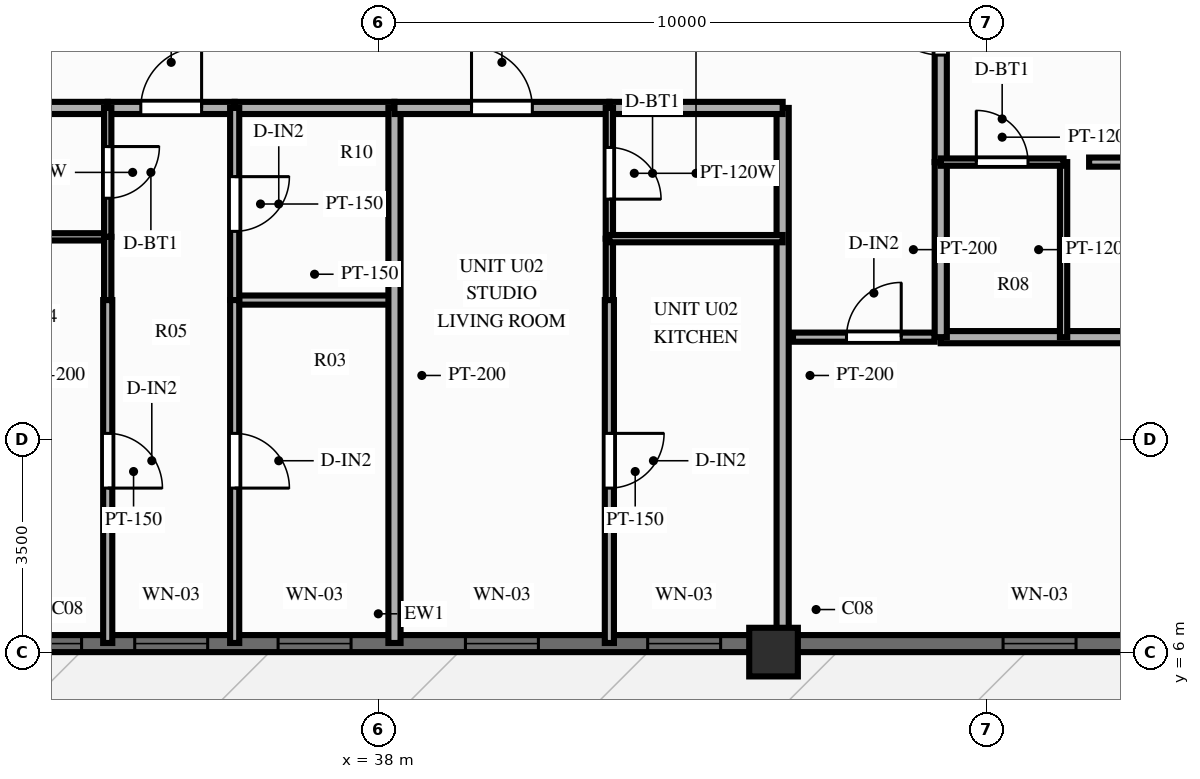
"""IFC4 building model, lengths in metres.
Left out: names, types, materials, properties, quantities, classifications, styles, units other than length and angle.
Written with IfcOpenShell. Run it as: python <this file> out.ifc"""

import sys

from ifc_helpers import new_model, si_unit, direction, frame, frame_2d, origin, origin_2d, place, context, subcontext, project, spatial, rectangle, extrude, source, transform, mapped, element, fill, save


model = new_model("IFC4")
c1 = context("Model", 3, precision=1e-05, world=origin(), true_north=direction((0.0, 1.0)))
c2 = subcontext(c1, "Body", "Model", "MODEL_VIEW")
j1 = project(units=[si_unit("LENGTHUNIT", "METRE"), si_unit("PLANEANGLEUNIT", "RADIAN")], contexts=[c1])
p1 = place(None, origin())
s1 = spatial("IfcSite", under=j1, at=p1, CompositionType="ELEMENT")
p2 = place(p1, origin())
s2 = spatial("IfcBuilding", under=s1, at=p2, CompositionType="ELEMENT")
p3 = place(p2, frame((0.0, 0.0, 179.8)))
s3 = spatial("IfcBuildingStorey", under=s2, at=p3, CompositionType="ELEMENT", Elevation=179.8)
m1 = source(origin(), c2, "Body", "SweptSolid", [
    extrude(rectangle(XDim=0.8, YDim=0.8, at=origin_2d()), origin(), (0.0, 0.0, 1.0), 3.0),
])
p4 = place(p3, frame((44.5, 6.0, 0.0), z_axis=(0.0, 0.0, 1.0), x_axis=(1.0, 0.0, 0.0)))
e1 = element("IfcColumn", 1, at=p4, inside=s3, PredefinedType="COLUMN", context=c2, shape_type="MappedRepresentation", body=[
    mapped(m1, transform((0.0, 0.0, 0.0), scale=1.0)),
])
p5 = place(p3, frame((22.75, 6.14, 0.0), z_axis=(0.0, 0.0, 1.0), x_axis=(1.0, 0.0, 0.0)))
e2 = element("IfcWall", 2, at=p5, inside=s3, PredefinedType="SOLIDWALL", context=c2, shape_type="SweptSolid", body=[
    extrude(rectangle(XDim=30.5, YDim=0.28, at=frame_2d((15.25, 0.0))), origin(), (0.0, 0.0, 1.0), 2.28),
])
p6 = place(p5, frame((4.925, 0.0, 0.0), z_axis=(0.0, 0.0, 1.0), x_axis=(-1.0, 0.0, 0.0)))
e3 = element("IfcOpeningElement", 3, at=p6, cuts=e2, PredefinedType="OPENING", context=c2, shape_type="SweptSolid", body=[
    extrude(rectangle(XDim=1.1, YDim=2.15, at=frame_2d((0.55, 1.075))), frame((0.0, 0.152, 0.0), z_axis=(0.0, -1.0, 0.0), x_axis=(1.0, 0.0, 0.0)), (0.0, 0.0, 1.0), 0.304),
])
p7 = place(p5, frame((9.42, 0.0, 0.25)))
e4 = element("IfcOpeningElement", 4, at=p7, cuts=e2, PredefinedType="OPENING", context=c2, shape_type="SweptSolid", body=[
    extrude(rectangle(XDim=0.95, YDim=1.5, at=frame_2d((0.475, 0.75))), frame((0.0, 0.152, 0.0), z_axis=(0.0, -1.0, 0.0), x_axis=(1.0, 0.0, 0.0)), (0.0, 0.0, 1.0), 0.304),
])
p8 = place(p5, frame((11.244, 0.0, 0.25)))
e5 = element("IfcOpeningElement", 5, at=p8, cuts=e2, PredefinedType="OPENING", context=c2, shape_type="SweptSolid", body=[
    extrude(rectangle(XDim=1.2, YDim=1.5, at=frame_2d((0.6, 0.75))), frame((0.0, 0.152, 0.0), z_axis=(0.0, -1.0, 0.0), x_axis=(1.0, 0.0, 0.0)), (0.0, 0.0, 1.0), 0.304),
])
p9 = place(p5, frame((13.602, 0.0, 0.25)))
e6 = element("IfcOpeningElement", 6, at=p9, cuts=e2, PredefinedType="OPENING", context=c2, shape_type="SweptSolid", body=[
    extrude(rectangle(XDim=1.2, YDim=1.5, at=frame_2d((0.6, 0.75))), frame((0.0, 0.152, 0.0), z_axis=(0.0, -1.0, 0.0), x_axis=(1.0, 0.0, 0.0)), (0.0, 0.0, 1.0), 0.304),
])
p10 = place(p5, frame((16.683, 0.0, 0.25)))
e7 = element("IfcOpeningElement", 7, at=p10, cuts=e2, PredefinedType="OPENING", context=c2, shape_type="SweptSolid", body=[
    extrude(rectangle(XDim=1.2, YDim=1.5, at=frame_2d((0.6, 0.75))), frame((0.0, 0.152, 0.0), z_axis=(0.0, -1.0, 0.0), x_axis=(1.0, 0.0, 0.0)), (0.0, 0.0, 1.0), 0.304),
])
p11 = place(p5, frame((19.68, 0.0, 0.25)))
e8 = element("IfcOpeningElement", 8, at=p11, cuts=e2, PredefinedType="OPENING", context=c2, shape_type="SweptSolid", body=[
    extrude(rectangle(XDim=1.2, YDim=1.5, at=frame_2d((0.6, 0.75))), frame((0.0, 0.152, 0.0), z_axis=(0.0, -1.0, 0.0), x_axis=(1.0, 0.0, 0.0)), (0.0, 0.0, 1.0), 0.304),
])
p12 = place(p5, frame((25.525, 0.0, 0.25)))
e9 = element("IfcOpeningElement", 9, at=p12, cuts=e2, PredefinedType="OPENING", context=c2, shape_type="SweptSolid", body=[
    extrude(rectangle(XDim=1.2, YDim=1.5, at=frame_2d((0.6, 0.75))), frame((0.0, 0.152, 0.0), z_axis=(0.0, -1.0, 0.0), x_axis=(1.0, 0.0, 0.0)), (0.0, 0.0, 1.0), 0.304),
])
p13 = place(p3, frame((44.82, 11.18, 0.0), z_axis=(0.0, 0.0, 1.0), x_axis=(1.0, 0.0, 0.0)))
e10 = element("IfcWall", 10, at=p13, inside=s3, PredefinedType="PARTITIONING", context=c2, shape_type="SweptSolid", body=[
    extrude(rectangle(XDim=2.33, YDim=0.15, at=frame_2d((1.165, 0.0))), origin(), (0.0, 0.0, 1.0), 2.79),
])
p14 = place(p13, frame((0.88, 0.0, 0.0)))
e11 = element("IfcOpeningElement", 11, at=p14, cuts=e10, PredefinedType="OPENING", context=c2, shape_type="SweptSolid", body=[
    extrude(rectangle(XDim=0.9, YDim=2.1, at=frame_2d((0.45, 1.05))), frame((0.0, 0.087, 0.0), z_axis=(0.0, -1.0, 0.0), x_axis=(1.0, 0.0, 0.0)), (0.0, 0.0, 1.0), 0.174),
])
p15 = place(p3, frame((44.65, 14.95, 0.0), z_axis=(0.0, 0.0, 1.0), x_axis=(0.0, -1.0, 0.0)))
e12 = element("IfcWall", 12, at=p15, inside=s3, PredefinedType="PARTITIONING", context=c2, shape_type="SweptSolid", body=[
    extrude(rectangle(XDim=8.8, YDim=0.2, at=frame_2d((4.4, 0.0))), origin(), (0.0, 0.0, 1.0), 2.39),
])
p16 = place(p3, frame((31.35, 14.95, 0.0), z_axis=(0.0, 0.0, 1.0), x_axis=(1.0, 0.0, 0.0)))
e13 = element("IfcWall", 13, at=p16, inside=s3, PredefinedType="PARTITIONING", context=c2, shape_type="SweptSolid", body=[
    extrude(rectangle(XDim=2.2, YDim=0.2, at=frame_2d((1.1, 0.0))), origin(), (0.0, 0.0, 1.0), 2.79),
])
p17 = place(p3, frame((33.55, 14.95, 0.0), z_axis=(0.0, 0.0, 1.0), x_axis=(1.0, 0.0, 0.0)))
e14 = element("IfcWall", 14, at=p17, inside=s3, PredefinedType="PARTITIONING", context=c2, shape_type="SweptSolid", body=[
    extrude(rectangle(XDim=2.088, YDim=0.2, at=frame_2d((1.044, 0.0))), origin(), (0.0, 0.0, 1.0), 2.79),
])
p18 = place(p17, frame((0.544, 0.0, 0.0)))
e15 = element("IfcOpeningElement", 15, at=p18, cuts=e14, PredefinedType="OPENING", context=c2, shape_type="SweptSolid", body=[
    extrude(rectangle(XDim=1.0, YDim=2.15, at=frame_2d((0.5, 1.075))), frame((0.0, 0.112, 0.0), z_axis=(0.0, -1.0, 0.0), x_axis=(1.0, 0.0, 0.0)), (0.0, 0.0, 1.0), 0.224),
])
p19 = place(p3, frame((35.638, 14.95, 0.0), z_axis=(0.0, 0.0, 1.0), x_axis=(1.0, 0.0, 0.0)))
e16 = element("IfcWall", 16, at=p19, inside=s3, PredefinedType="PARTITIONING", context=c2, shape_type="SweptSolid", body=[
    extrude(rectangle(XDim=2.628, YDim=0.2, at=frame_2d((1.314, 0.0))), origin(), (0.0, 0.0, 1.0), 2.79),
])
p20 = place(p3, frame((31.35, 12.83, 0.0), z_axis=(0.0, 0.0, 1.0), x_axis=(1.0, 0.0, 0.0)))
e17 = element("IfcWall", 17, at=p20, inside=s3, PredefinedType="PARTITIONING", context=c2, shape_type="SweptSolid", body=[
    extrude(rectangle(XDim=2.2, YDim=0.12, at=frame_2d((1.1, 0.0))), origin(), (0.0, 0.0, 1.0), 2.79),
])
p21 = place(p3, frame((35.638, 11.79, 0.0), z_axis=(0.0, 0.0, 1.0), x_axis=(1.0, 0.0, 0.0)))
e18 = element("IfcWall", 18, at=p21, inside=s3, PredefinedType="PARTITIONING", context=c2, shape_type="SweptSolid", body=[
    extrude(rectangle(XDim=2.628, YDim=0.15, at=frame_2d((1.314, 0.0))), origin(), (0.0, 0.0, 1.0), 2.49),
])
p22 = place(p3, frame((33.55, 14.95, 0.0), z_axis=(0.0, 0.0, 1.0), x_axis=(0.0, -1.0, 0.0)))
e19 = element("IfcWall", 19, at=p22, inside=s3, PredefinedType="PARTITIONING", context=c2, shape_type="SweptSolid", body=[
    extrude(rectangle(XDim=2.12, YDim=0.12, at=frame_2d((1.06, 0.0))), origin(), (0.0, 0.0, 1.0), 2.79),
])
p23 = place(p22, frame((0.635, 0.0, 0.0)))
e20 = element("IfcOpeningElement", 20, at=p23, cuts=e19, PredefinedType="OPENING", context=c2, shape_type="SweptSolid", body=[
    extrude(rectangle(XDim=0.85, YDim=2.05, at=frame_2d((0.425, 1.025))), frame((0.0, 0.072, 0.0), z_axis=(0.0, -1.0, 0.0), x_axis=(1.0, 0.0, 0.0)), (0.0, 0.0, 1.0), 0.144),
])
p24 = place(p3, frame((33.55, 12.83, 0.0), z_axis=(0.0, 0.0, 1.0), x_axis=(0.0, -1.0, 0.0)))
e21 = element("IfcWall", 21, at=p24, inside=s3, PredefinedType="PARTITIONING", context=c2, shape_type="SweptSolid", body=[
    extrude(rectangle(XDim=1.04, YDim=0.12, at=frame_2d((0.52, 0.0))), origin(), (0.0, 0.0, 1.0), 2.79),
])
p25 = place(p3, frame((33.55, 11.79, 0.0), z_axis=(0.0, 0.0, 1.0), x_axis=(0.0, -1.0, 0.0)))
e22 = element("IfcWall", 22, at=p25, inside=s3, PredefinedType="PARTITIONING", context=c2, shape_type="SweptSolid", body=[
    extrude(rectangle(XDim=5.64, YDim=0.15, at=frame_2d((2.82, 0.0))), origin(), (0.0, 0.0, 1.0), 2.79),
])
p26 = place(p25, frame((2.192, 0.0, 0.0)))
e23 = element("IfcOpeningElement", 23, at=p26, cuts=e22, PredefinedType="OPENING", context=c2, shape_type="SweptSolid", body=[
    extrude(rectangle(XDim=0.9, YDim=2.1, at=frame_2d((0.45, 1.05))), frame((0.0, 0.087, 0.0), z_axis=(0.0, -1.0, 0.0), x_axis=(1.0, 0.0, 0.0)), (0.0, 0.0, 1.0), 0.174),
])
p27 = place(p3, frame((35.638, 14.95, 0.0), z_axis=(0.0, 0.0, 1.0), x_axis=(0.0, -1.0, 0.0)))
e24 = element("IfcWall", 24, at=p27, inside=s3, PredefinedType="PARTITIONING", context=c2, shape_type="SweptSolid", body=[
    extrude(rectangle(XDim=3.16, YDim=0.15, at=frame_2d((1.58, 0.0))), origin(), (0.0, 0.0, 1.0), 2.79),
])
p28 = place(p27, frame((1.13, 0.0, 0.0)))
e25 = element("IfcOpeningElement", 25, at=p28, cuts=e24, PredefinedType="OPENING", context=c2, shape_type="SweptSolid", body=[
    extrude(rectangle(XDim=0.9, YDim=2.1, at=frame_2d((0.45, 1.05))), frame((0.0, 0.087, 0.0), z_axis=(0.0, -1.0, 0.0), x_axis=(1.0, 0.0, 0.0)), (0.0, 0.0, 1.0), 0.174),
])
p29 = place(p3, frame((35.638, 11.79, 0.0), z_axis=(0.0, 0.0, 1.0), x_axis=(0.0, -1.0, 0.0)))
e26 = element("IfcWall", 26, at=p29, inside=s3, PredefinedType="PARTITIONING", context=c2, shape_type="SweptSolid", body=[
    extrude(rectangle(XDim=5.64, YDim=0.15, at=frame_2d((2.82, 0.0))), origin(), (0.0, 0.0, 1.0), 2.79),
])
p30 = place(p29, frame((2.192, 0.0, 0.0)))
e27 = element("IfcOpeningElement", 27, at=p30, cuts=e26, PredefinedType="OPENING", context=c2, shape_type="SweptSolid", body=[
    extrude(rectangle(XDim=0.9, YDim=2.1, at=frame_2d((0.45, 1.05))), frame((0.0, 0.087, 0.0), z_axis=(0.0, -1.0, 0.0), x_axis=(1.0, 0.0, 0.0)), (0.0, 0.0, 1.0), 0.174),
])
p31 = place(p3, frame((38.266, 14.95, 0.0), z_axis=(0.0, 0.0, 1.0), x_axis=(0.0, -1.0, 0.0)))
e28 = element("IfcWall", 28, at=p31, inside=s3, PredefinedType="PARTITIONING", context=c2, shape_type="SweptSolid", body=[
    extrude(rectangle(XDim=8.8, YDim=0.2, at=frame_2d((4.4, 0.0))), origin(), (0.0, 0.0, 1.0), 2.79),
])
p32 = place(p3, frame((38.266, 14.95, 0.0), z_axis=(0.0, 0.0, 1.0), x_axis=(1.0, 0.0, 0.0)))
e29 = element("IfcWall", 29, at=p32, inside=s3, PredefinedType="PARTITIONING", context=c2, shape_type="SweptSolid", body=[
    extrude(rectangle(XDim=3.534, YDim=0.2, at=frame_2d((1.767, 0.0))), origin(), (0.0, 0.0, 1.0), 2.79),
])
p33 = place(p32, frame((1.267, 0.0, 0.0)))
e30 = element("IfcOpeningElement", 30, at=p33, cuts=e29, PredefinedType="OPENING", context=c2, shape_type="SweptSolid", body=[
    extrude(rectangle(XDim=1.0, YDim=2.15, at=frame_2d((0.5, 1.075))), frame((0.0, 0.112, 0.0), z_axis=(0.0, -1.0, 0.0), x_axis=(1.0, 0.0, 0.0)), (0.0, 0.0, 1.0), 0.224),
])
p34 = place(p3, frame((41.8, 14.95, 0.0), z_axis=(0.0, 0.0, 1.0), x_axis=(1.0, 0.0, 0.0)))
e31 = element("IfcWall", 31, at=p34, inside=s3, PredefinedType="PARTITIONING", context=c2, shape_type="SweptSolid", body=[
    extrude(rectangle(XDim=2.85, YDim=0.2, at=frame_2d((1.425, 0.0))), origin(), (0.0, 0.0, 1.0), 2.79),
])
p35 = place(p3, frame((41.8, 14.95, 0.0), z_axis=(0.0, 0.0, 1.0), x_axis=(0.0, -1.0, 0.0)))
e32 = element("IfcWall", 32, at=p35, inside=s3, PredefinedType="PARTITIONING", context=c2, shape_type="SweptSolid", body=[
    extrude(rectangle(XDim=2.15, YDim=0.12, at=frame_2d((1.075, 0.0))), origin(), (0.0, 0.0, 1.0), 2.79),
])
p36 = place(p35, frame((0.65, 0.0, 0.0)))
e33 = element("IfcOpeningElement", 33, at=p36, cuts=e32, PredefinedType="OPENING", context=c2, shape_type="SweptSolid", body=[
    extrude(rectangle(XDim=0.85, YDim=2.05, at=frame_2d((0.425, 1.025))), frame((0.0, 0.072, 0.0), z_axis=(0.0, -1.0, 0.0), x_axis=(1.0, 0.0, 0.0)), (0.0, 0.0, 1.0), 0.144),
])
p37 = place(p3, frame((41.8, 12.8, 0.0), z_axis=(0.0, 0.0, 1.0), x_axis=(0.0, -1.0, 0.0)))
e34 = element("IfcWall", 34, at=p37, inside=s3, PredefinedType="PARTITIONING", context=c2, shape_type="SweptSolid", body=[
    extrude(rectangle(XDim=1.01, YDim=0.12, at=frame_2d((0.505, 0.0))), origin(), (0.0, 0.0, 1.0), 2.79),
])
p38 = place(p3, frame((41.8, 12.8, 0.0), z_axis=(0.0, 0.0, 1.0), x_axis=(1.0, 0.0, 0.0)))
e35 = element("IfcWall", 35, at=p38, inside=s3, PredefinedType="PARTITIONING", context=c2, shape_type="SweptSolid", body=[
    extrude(rectangle(XDim=2.85, YDim=0.12, at=frame_2d((1.425, 0.0))), origin(), (0.0, 0.0, 1.0), 2.79),
])
p39 = place(p3, frame((41.8, 11.79, 0.0), z_axis=(0.0, 0.0, 1.0), x_axis=(0.0, -1.0, 0.0)))
e36 = element("IfcWall", 36, at=p39, inside=s3, PredefinedType="PARTITIONING", context=c2, shape_type="SweptSolid", body=[
    extrude(rectangle(XDim=5.64, YDim=0.15, at=frame_2d((2.82, 0.0))), origin(), (0.0, 0.0, 1.0), 2.79),
])
p40 = place(p39, frame((2.192, 0.0, 0.0)))
e37 = element("IfcOpeningElement", 37, at=p40, cuts=e36, PredefinedType="OPENING", context=c2, shape_type="SweptSolid", body=[
    extrude(rectangle(XDim=0.9, YDim=2.1, at=frame_2d((0.45, 1.05))), frame((0.0, 0.087, 0.0), z_axis=(0.0, -1.0, 0.0), x_axis=(1.0, 0.0, 0.0)), (0.0, 0.0, 1.0), 0.174),
])
p41 = place(p3, frame((47.25, 11.18, 0.0), z_axis=(0.0, 0.0, 1.0), x_axis=(1.0, 0.0, 0.0)))
e38 = element("IfcWall", 38, at=p41, inside=s3, PredefinedType="PARTITIONING", context=c2, shape_type="SweptSolid", body=[
    extrude(rectangle(XDim=10.85, YDim=0.2, at=frame_2d((5.425, 0.0))), origin(), (0.0, 0.0, 1.0), 2.79),
])
p42 = place(p3, frame((47.25, 11.18, 0.0), z_axis=(0.0, 0.0, 1.0), x_axis=(0.0, 1.0, 0.0)))
e39 = element("IfcWall", 39, at=p42, inside=s3, PredefinedType="PARTITIONING", context=c2, shape_type="SweptSolid", body=[
    extrude(rectangle(XDim=2.879, YDim=0.2, at=frame_2d((1.439, 0.0))), origin(), (0.0, 0.0, 1.0), 2.79),
])
p43 = place(p3, frame((47.25, 14.059, 0.0), z_axis=(0.0, 0.0, 1.0), x_axis=(0.0, 1.0, 0.0)))
e40 = element("IfcWall", 40, at=p43, inside=s3, PredefinedType="PARTITIONING", context=c2, shape_type="SweptSolid", body=[
    extrude(rectangle(XDim=4.651, YDim=0.2, at=frame_2d((2.326, 0.0))), origin(), (0.0, 0.0, 1.0), 2.79),
])
p44 = place(p43, frame((1.76, 0.0, 0.0)))
e41 = element("IfcOpeningElement", 41, at=p44, cuts=e40, PredefinedType="OPENING", context=c2, shape_type="SweptSolid", body=[
    extrude(rectangle(XDim=1.0, YDim=2.15, at=frame_2d((0.5, 1.075))), frame((0.0, 0.112, 0.0), z_axis=(0.0, -1.0, 0.0), x_axis=(1.0, 0.0, 0.0)), (0.0, 0.0, 1.0), 0.224),
])
p45 = place(p3, frame((49.27, 11.18, 0.0), z_axis=(0.0, 0.0, 1.0), x_axis=(0.0, 1.0, 0.0)))
e42 = element("IfcWall", 42, at=p45, inside=s3, PredefinedType="PARTITIONING", context=c2, shape_type="SweptSolid", body=[
    extrude(rectangle(XDim=2.879, YDim=0.12, at=frame_2d((1.439, 0.0))), origin(), (0.0, 0.0, 1.0), 2.79),
])
p46 = place(p3, frame((47.25, 14.059, 0.0), z_axis=(0.0, 0.0, 1.0), x_axis=(1.0, 0.0, 0.0)))
e43 = element("IfcWall", 43, at=p46, inside=s3, PredefinedType="PARTITIONING", context=c2, shape_type="SweptSolid", body=[
    extrude(rectangle(XDim=2.02, YDim=0.12, at=frame_2d((1.01, 0.0))), origin(), (0.0, 0.0, 1.0), 2.79),
])
p47 = place(p46, frame((0.585, 0.0, 0.0)))
e44 = element("IfcOpeningElement", 44, at=p47, cuts=e43, PredefinedType="OPENING", context=c2, shape_type="SweptSolid", body=[
    extrude(rectangle(XDim=0.85, YDim=2.05, at=frame_2d((0.425, 1.025))), frame((0.0, 0.072, 0.0), z_axis=(0.0, -1.0, 0.0), x_axis=(1.0, 0.0, 0.0)), (0.0, 0.0, 1.0), 0.144),
])
p48 = place(p3, frame((49.69, 14.059, 0.0), z_axis=(0.0, 0.0, 1.0), x_axis=(1.0, 0.0, 0.0)))
e45 = element("IfcWall", 45, at=p48, inside=s3, PredefinedType="PARTITIONING", context=c2, shape_type="SweptSolid", body=[
    extrude(rectangle(XDim=8.41, YDim=0.15, at=frame_2d((4.205, 0.0))), origin(), (0.0, 0.0, 1.0), 2.79),
])
p49 = place(p48, frame((3.462, 0.0, 0.0)))
e46 = element("IfcOpeningElement", 46, at=p49, cuts=e45, PredefinedType="OPENING", context=c2, shape_type="SweptSolid", body=[
    extrude(rectangle(XDim=0.9, YDim=2.1, at=frame_2d((0.45, 1.05))), frame((0.0, 0.087, 0.0), z_axis=(0.0, -1.0, 0.0), x_axis=(1.0, 0.0, 0.0)), (0.0, 0.0, 1.0), 0.174),
])
m2 = source(origin(), c2, "Body", "SweptSolid", [
    extrude(rectangle(XDim=0.95, YDim=1.5, at=frame_2d((0.475, 0.75))), frame((0.0, 0.03, 0.0), z_axis=(0.0, -1.0, 0.0), x_axis=(1.0, 0.0, 0.0)), (0.0, 0.0, 1.0), 0.06),
])
p50 = place(p7, origin())
e47 = element("IfcWindow", 47, at=p50, inside=s3, PartitioningType="SINGLE_PANEL", PredefinedType="WINDOW", context=c2, shape_type="MappedRepresentation", body=[
    mapped(m2, transform((0.0, 0.0, 0.0), scale=1.0)),
])
fill(e4, e47)
m3 = source(origin(), c2, "Body", "SweptSolid", [
    extrude(rectangle(XDim=1.2, YDim=1.5, at=frame_2d((0.6, 0.75))), frame((0.0, 0.03, 0.0), z_axis=(0.0, -1.0, 0.0), x_axis=(1.0, 0.0, 0.0)), (0.0, 0.0, 1.0), 0.06),
])
p51 = place(p8, origin())
e48 = element("IfcWindow", 48, at=p51, inside=s3, PartitioningType="SINGLE_PANEL", PredefinedType="WINDOW", context=c2, shape_type="MappedRepresentation", body=[
    mapped(m3, transform((0.0, 0.0, 0.0), scale=1.0)),
])
fill(e5, e48)
p52 = place(p9, origin())
e49 = element("IfcWindow", 49, at=p52, inside=s3, PartitioningType="SINGLE_PANEL", PredefinedType="WINDOW", context=c2, shape_type="MappedRepresentation", body=[
    mapped(m3, transform((0.0, 0.0, 0.0), scale=1.0)),
])
fill(e6, e49)
p53 = place(p10, origin())
e50 = element("IfcWindow", 50, at=p53, inside=s3, PartitioningType="SINGLE_PANEL", PredefinedType="WINDOW", context=c2, shape_type="MappedRepresentation", body=[
    mapped(m3, transform((0.0, 0.0, 0.0), scale=1.0)),
])
fill(e7, e50)
p54 = place(p11, origin())
e51 = element("IfcWindow", 51, at=p54, inside=s3, PartitioningType="SINGLE_PANEL", PredefinedType="WINDOW", context=c2, shape_type="MappedRepresentation", body=[
    mapped(m3, transform((0.0, 0.0, 0.0), scale=1.0)),
])
fill(e8, e51)
p55 = place(p12, origin())
e52 = element("IfcWindow", 52, at=p55, inside=s3, PartitioningType="SINGLE_PANEL", PredefinedType="WINDOW", context=c2, shape_type="MappedRepresentation", body=[
    mapped(m3, transform((0.0, 0.0, 0.0), scale=1.0)),
])
fill(e9, e52)
m4 = source(origin(), c2, "Body", "SweptSolid", [
    extrude(rectangle(XDim=0.9, YDim=2.1, at=frame_2d((0.45, 1.05))), frame((0.0, 0.025, 0.0), z_axis=(0.0, -1.0, 0.0), x_axis=(1.0, 0.0, 0.0)), (0.0, 0.0, 1.0), 0.05),
])
p56 = place(p14, origin())
e53 = element("IfcDoor", 53, at=p56, inside=s3, OperationType="SINGLE_SWING_RIGHT", PredefinedType="DOOR", context=c2, shape_type="MappedRepresentation", body=[
    mapped(m4, transform((0.0, 0.0, 0.0), scale=1.0)),
])
fill(e11, e53)
m5 = source(origin(), c2, "Body", "SweptSolid", [
    extrude(rectangle(XDim=1.0, YDim=2.15, at=frame_2d((0.5, 1.075))), frame((0.0, 0.025, 0.0), z_axis=(0.0, -1.0, 0.0), x_axis=(1.0, 0.0, 0.0)), (0.0, 0.0, 1.0), 0.05),
])
p57 = place(p18, origin())
e54 = element("IfcDoor", 54, at=p57, inside=s3, OperationType="SINGLE_SWING_RIGHT", PredefinedType="DOOR", context=c2, shape_type="MappedRepresentation", body=[
    mapped(m5, transform((0.0, 0.0, 0.0), scale=1.0)),
])
fill(e15, e54)
m6 = source(origin(), c2, "Body", "SweptSolid", [
    extrude(rectangle(XDim=0.85, YDim=2.05, at=frame_2d((0.425, 1.025))), frame((0.0, 0.025, 0.0), z_axis=(0.0, -1.0, 0.0), x_axis=(1.0, 0.0, 0.0)), (0.0, 0.0, 1.0), 0.05),
])
p58 = place(p23, origin())
e55 = element("IfcDoor", 55, at=p58, inside=s3, OperationType="SINGLE_SWING_LEFT", PredefinedType="DOOR", context=c2, shape_type="MappedRepresentation", body=[
    mapped(m6, transform((0.0, 0.0, 0.0), scale=1.0)),
])
fill(e20, e55)
p59 = place(p26, origin())
e56 = element("IfcDoor", 56, at=p59, inside=s3, OperationType="SINGLE_SWING_RIGHT", PredefinedType="DOOR", context=c2, shape_type="MappedRepresentation", body=[
    mapped(m4, transform((0.0, 0.0, 0.0), scale=1.0)),
])
fill(e23, e56)
p60 = place(p28, origin())
e57 = element("IfcDoor", 57, at=p60, inside=s3, OperationType="SINGLE_SWING_LEFT", PredefinedType="DOOR", context=c2, shape_type="MappedRepresentation", body=[
    mapped(m4, transform((0.0, 0.0, 0.0), scale=1.0)),
])
fill(e25, e57)
p61 = place(p30, origin())
e58 = element("IfcDoor", 58, at=p61, inside=s3, OperationType="SINGLE_SWING_RIGHT", PredefinedType="DOOR", context=c2, shape_type="MappedRepresentation", body=[
    mapped(m4, transform((0.0, 0.0, 0.0), scale=1.0)),
])
fill(e27, e58)
p62 = place(p33, origin())
e59 = element("IfcDoor", 59, at=p62, inside=s3, OperationType="SINGLE_SWING_LEFT", PredefinedType="DOOR", context=c2, shape_type="MappedRepresentation", body=[
    mapped(m5, transform((0.0, 0.0, 0.0), scale=1.0)),
])
fill(e30, e59)
p63 = place(p36, origin())
e60 = element("IfcDoor", 60, at=p63, inside=s3, OperationType="SINGLE_SWING_RIGHT", PredefinedType="DOOR", context=c2, shape_type="MappedRepresentation", body=[
    mapped(m6, transform((0.0, 0.0, 0.0), scale=1.0)),
])
fill(e33, e60)
p64 = place(p40, origin())
e61 = element("IfcDoor", 61, at=p64, inside=s3, OperationType="SINGLE_SWING_LEFT", PredefinedType="DOOR", context=c2, shape_type="MappedRepresentation", body=[
    mapped(m4, transform((0.0, 0.0, 0.0), scale=1.0)),
])
fill(e37, e61)
p65 = place(p44, origin())
e62 = element("IfcDoor", 62, at=p65, inside=s3, OperationType="SINGLE_SWING_RIGHT", PredefinedType="DOOR", context=c2, shape_type="MappedRepresentation", body=[
    mapped(m5, transform((0.0, 0.0, 0.0), scale=1.0)),
])
fill(e41, e62)
p66 = place(p47, origin())
e63 = element("IfcDoor", 63, at=p66, inside=s3, OperationType="SINGLE_SWING_LEFT", PredefinedType="DOOR", context=c2, shape_type="MappedRepresentation", body=[
    mapped(m6, transform((0.0, 0.0, 0.0), scale=1.0)),
])
fill(e44, e63)
save(model, sys.argv[1])
